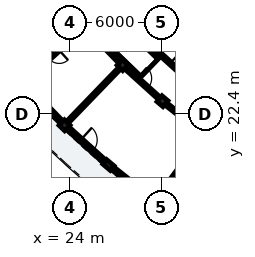
"""IFC4 building model, lengths in metres.
Left out: names, types, materials, properties, quantities, classifications, styles, units other than length and angle.
Written with IfcOpenShell. Run it as: python <this file> out.ifc"""

import sys

from ifc_helpers import new_model, si_unit, direction, frame, frame_2d, origin, origin_2d, place, context, subcontext, project, spatial, rectangle, extrude, element, fill, save


model = new_model("IFC4")
c1 = context("Model", 3, precision=1e-05, world=origin(), true_north=direction((0.0, 1.0)))
c2 = subcontext(c1, "Body", "Model", "MODEL_VIEW")
j1 = project(units=[si_unit("LENGTHUNIT", "METRE"), si_unit("PLANEANGLEUNIT", "RADIAN")], contexts=[c1])
p1 = place(None, origin())
s1 = spatial("IfcSite", under=j1, at=p1, CompositionType="ELEMENT")
p2 = place(p1, origin())
s2 = spatial("IfcBuilding", under=s1, at=p2, CompositionType="ELEMENT")
p3 = place(p2, frame((0.0, 0.0, 29.0)))
s3 = spatial("IfcBuildingStorey", under=s2, at=p3, CompositionType="ELEMENT", Elevation=29.0)
for number, where, z_axis, x_axis in (
    (1, (27.454, 25.62, 0.0), (0.0, 0.0, 1.0), (-0.695, -0.719, 0.0)),
    (2, (23.633, 21.663, 0.0), (0.0, 0.0, 1.0), (-0.695, -0.719, 0.0)),
    (3, (30.077, 23.247, 0.0), (0.0, 0.0, 1.0), (-0.646, -0.763, 0.0)),
):
    element("IfcColumn", number, at=place(p3, frame(where, z_axis=z_axis, x_axis=x_axis)), inside=s3, PredefinedType="COLUMN", context=c2, shape_type="SweptSolid", body=[
        extrude(rectangle(XDim=0.51, YDim=0.51, at=origin_2d()), origin(), (0.0, 0.0, 1.0), 3.115),
    ])
p4 = place(p3, frame((26.523, 19.05, 0.0), z_axis=(0.0, 0.0, 1.0), x_axis=(-0.646123979643, -0.763232469783, 0.0)))
e4 = element("IfcColumn", 4, at=p4, inside=s3, PredefinedType="PILASTER", context=c2, shape_type="SweptSolid", body=[
    extrude(rectangle(XDim=0.39, YDim=0.63, at=origin_2d()), origin(), (0.0, 0.0, 1.0), 3.115),
])
p5 = place(p3, frame((21.035, 24.342, 0.0), z_axis=(0.0, 0.0, 1.0), x_axis=(0.696232818878, -0.717816036263, 0.0)))
e5 = element("IfcWall", 5, at=p5, inside=s3, PredefinedType="SOLIDWALL", context=c2, shape_type="SweptSolid", body=[
    extrude(rectangle(XDim=3.507, YDim=0.245, at=frame_2d((1.753, 0.0))), origin(), (0.0, 0.0, 1.0), 2.355),
])
p6 = place(p5, frame((1.104, 0.0, 0.55)))
e6 = element("IfcOpeningElement", 6, at=p6, cuts=e5, PredefinedType="OPENING", context=c2, shape_type="SweptSolid", body=[
    extrude(rectangle(XDim=1.3, YDim=1.6, at=frame_2d((0.65, 0.8))), frame((0.0, 0.133, 0.0), z_axis=(0.0, -1.0, 0.0), x_axis=(1.0, 0.0, 0.0)), (0.0, 0.0, 1.0), 0.265),
])
p7 = place(p3, frame((23.8, 21.512, 0.0), z_axis=(0.0, 0.0, 1.0), x_axis=(0.741654519649, -0.670782061093, 0.0)))
e7 = element("IfcWall", 7, at=p7, inside=s3, PredefinedType="SOLIDWALL", context=c2, shape_type="SweptSolid", body=[
    extrude(rectangle(XDim=3.507, YDim=0.245, at=frame_2d((1.753, 0.0))), origin(), (0.0, 0.0, 1.0), 2.355),
])
p8 = place(p7, frame((1.213, 0.0, 0.0)))
e8 = element("IfcOpeningElement", 8, at=p8, cuts=e7, PredefinedType="OPENING", context=c2, shape_type="SweptSolid", body=[
    extrude(rectangle(XDim=1.08, YDim=2.15, at=frame_2d((0.54, 1.075))), frame((0.0, 0.133, 0.0), z_axis=(0.0, -1.0, 0.0), x_axis=(1.0, 0.0, 0.0)), (0.0, 0.0, 1.0), 0.265),
])
p9 = place(p3, frame((26.653, 18.947, 0.0), z_axis=(0.0, 0.0, 1.0), x_axis=(0.783976646649, -0.620790316861, 0.0)))
e9 = element("IfcWall", 9, at=p9, inside=s3, PredefinedType="SOLIDWALL", context=c2, shape_type="SweptSolid", body=[
    extrude(rectangle(XDim=3.507, YDim=0.245, at=frame_2d((1.753, 0.0))), origin(), (0.0, 0.0, 1.0), 2.355),
])
p10 = place(p9, frame((0.953, 0.0, 0.35)))
e10 = element("IfcOpeningElement", 10, at=p10, cuts=e9, PredefinedType="OPENING", context=c2, shape_type="SweptSolid", body=[
    extrude(rectangle(XDim=1.6, YDim=1.75, at=frame_2d((0.8, 0.875))), frame((0.0, 0.133, 0.0), z_axis=(0.0, -1.0, 0.0), x_axis=(1.0, 0.0, 0.0)), (0.0, 0.0, 1.0), 0.265),
])
p11 = place(p3, frame((24.695, 27.89, 0.0), z_axis=(0.0, 0.0, 1.0), x_axis=(-0.740212663782, -0.672372822456, 0.0)))
e11 = element("IfcWall", 11, at=p11, inside=s3, PredefinedType="PARTITIONING", context=c2, shape_type="SweptSolid", body=[
    extrude(rectangle(XDim=4.7, YDim=0.125, at=frame_2d((2.35, 0.0))), origin(), (0.0, 0.0, 1.0), 2.37),
])
p12 = place(p11, frame((1.915, 0.0, 0.0)))
e12 = element("IfcOpeningElement", 12, at=p12, cuts=e11, PredefinedType="OPENING", context=c2, shape_type="SweptSolid", body=[
    extrude(rectangle(XDim=0.87, YDim=2.08, at=frame_2d((0.435, 1.04))), frame((0.0, 0.073, 0.0), z_axis=(0.0, -1.0, 0.0), x_axis=(1.0, 0.0, 0.0)), (0.0, 0.0, 1.0), 0.145),
])
p13 = place(p3, frame((25.235, 27.907, 0.0), z_axis=(0.0, 0.0, 1.0), x_axis=(0.696223786753, -0.717824796701, 0.0)))
e13 = element("IfcWall", 13, at=p13, inside=s3, PredefinedType="PARTITIONING", context=c2, shape_type="SweptSolid", body=[
    extrude(rectangle(XDim=2.837, YDim=0.195, at=frame_2d((1.418, 0.0))), origin(), (0.0, 0.0, 1.0), 2.37),
])
p14 = place(p13, frame((0.934, 0.0, 0.0)))
e14 = element("IfcOpeningElement", 14, at=p14, cuts=e13, PredefinedType="OPENING", context=c2, shape_type="SweptSolid", body=[
    extrude(rectangle(XDim=0.97, YDim=2.15, at=frame_2d((0.485, 1.075))), frame((0.0, 0.107, 0.0), z_axis=(0.0, -1.0, 0.0), x_axis=(1.0, 0.0, 0.0)), (0.0, 0.0, 1.0), 0.215),
])
p15 = place(p3, frame((27.176, 25.332, 0.0), z_axis=(0.0, 0.0, 1.0), x_axis=(-0.69466218314, -0.719336118456, 0.0)))
e15 = element("IfcWall", 15, at=p15, inside=s3, PredefinedType="PARTITIONING", context=c2, shape_type="SweptSolid", body=[
    extrude(rectangle(XDim=4.7, YDim=0.175, at=frame_2d((2.35, 0.0))), origin(), (0.0, 0.0, 1.0), 2.37),
])
p16 = place(p3, frame((27.713, 25.385, 0.0), z_axis=(0.0, 0.0, 1.0), x_axis=(0.741631592147, -0.670807410163, 0.0)))
e16 = element("IfcWall", 16, at=p16, inside=s3, PredefinedType="PARTITIONING", context=c2, shape_type="SweptSolid", body=[
    extrude(rectangle(XDim=2.837, YDim=0.195, at=frame_2d((1.418, 0.0))), origin(), (0.0, 0.0, 1.0), 2.37),
])
p17 = place(p16, frame((0.944, 0.0, 0.0)))
e17 = element("IfcOpeningElement", 17, at=p17, cuts=e16, PredefinedType="OPENING", context=c2, shape_type="SweptSolid", body=[
    extrude(rectangle(XDim=0.95, YDim=2.13, at=frame_2d((0.475, 1.065))), frame((0.0, 0.107, 0.0), z_axis=(0.0, -1.0, 0.0), x_axis=(1.0, 0.0, 0.0)), (0.0, 0.0, 1.0), 0.215),
])
p18 = place(p3, frame((29.241, 26.968, 0.0), z_axis=(0.0, 0.0, 1.0), x_axis=(0.74166462946, -0.670770882945, 0.0)))
e18 = element("IfcWall", 18, at=p18, inside=s3, PredefinedType="PARTITIONING", context=c2, shape_type="SweptSolid", body=[
    extrude(rectangle(XDim=2.693, YDim=0.195, at=frame_2d((1.347, 0.0))), origin(), (0.0, 0.0, 1.0), 2.37),
])
p19 = place(p18, frame((0.872, 0.0, 0.0)))
e19 = element("IfcOpeningElement", 19, at=p19, cuts=e18, PredefinedType="OPENING", context=c2, shape_type="SweptSolid", body=[
    extrude(rectangle(XDim=0.95, YDim=2.13, at=frame_2d((0.475, 1.065))), frame((0.0, 0.107, 0.0), z_axis=(0.0, -1.0, 0.0), x_axis=(1.0, 0.0, 0.0)), (0.0, 0.0, 1.0), 0.215),
])
p20 = place(p3, frame((30.351, 23.03, 0.0), z_axis=(0.0, 0.0, 1.0), x_axis=(0.783965548427, -0.620804332201, 0.0)))
e20 = element("IfcWall", 20, at=p20, inside=s3, PredefinedType="PARTITIONING", context=c2, shape_type="SweptSolid", body=[
    extrude(rectangle(XDim=2.837, YDim=0.195, at=frame_2d((1.418, 0.0))), origin(), (0.0, 0.0, 1.0), 2.37),
])
p21 = place(p20, frame((0.954, 0.0, 0.0)))
e21 = element("IfcOpeningElement", 21, at=p21, cuts=e20, PredefinedType="OPENING", context=c2, shape_type="SweptSolid", body=[
    extrude(rectangle(XDim=0.93, YDim=2.12, at=frame_2d((0.465, 1.06))), frame((0.0, 0.107, 0.0), z_axis=(0.0, -1.0, 0.0), x_axis=(1.0, 0.0, 0.0)), (0.0, 0.0, 1.0), 0.215),
])
p22 = place(p3, frame((32.612, 20.73, 0.0), z_axis=(0.0, 0.0, 1.0), x_axis=(-0.59482622273, -0.803854318116, 0.0)))
e22 = element("IfcWall", 22, at=p22, inside=s3, PredefinedType="PARTITIONING", context=c2, shape_type="SweptSolid", body=[
    extrude(rectangle(XDim=4.7, YDim=0.175, at=frame_2d((2.35, 0.0))), origin(), (0.0, 0.0, 1.0), 2.37),
])
p23 = place(p8, origin())
e23 = element("IfcDoor", 23, at=p23, inside=s3, OperationType="SINGLE_SWING_LEFT", PredefinedType="DOOR", context=c2, shape_type="SweptSolid", body=[
    extrude(rectangle(XDim=1.08, YDim=2.15, at=frame_2d((0.54, 1.075))), frame((0.0, 0.025, 0.0), z_axis=(0.0, -1.0, 0.0), x_axis=(1.0, 0.0, 0.0)), (0.0, 0.0, 1.0), 0.05),
])
fill(e8, e23)
p24 = place(p10, origin())
e24 = element("IfcWindow", 24, at=p24, inside=s3, PartitioningType="SINGLE_PANEL", PredefinedType="WINDOW", context=c2, shape_type="SweptSolid", body=[
    extrude(rectangle(XDim=1.6, YDim=1.75, at=frame_2d((0.8, 0.875))), frame((0.0, 0.03, 0.0), z_axis=(0.0, -1.0, 0.0), x_axis=(1.0, 0.0, 0.0)), (0.0, 0.0, 1.0), 0.06),
])
fill(e10, e24)
p25 = place(p12, origin())
e25 = element("IfcDoor", 25, at=p25, inside=s3, OperationType="SINGLE_SWING_LEFT", PredefinedType="DOOR", context=c2, shape_type="SweptSolid", body=[
    extrude(rectangle(XDim=0.87, YDim=2.08, at=frame_2d((0.435, 1.04))), frame((0.0, 0.025, 0.0), z_axis=(0.0, -1.0, 0.0), x_axis=(1.0, 0.0, 0.0)), (0.0, 0.0, 1.0), 0.05),
])
fill(e12, e25)
p26 = place(p17, origin())
e26 = element("IfcDoor", 26, at=p26, inside=s3, OperationType="SINGLE_SWING_LEFT", PredefinedType="DOOR", context=c2, shape_type="SweptSolid", body=[
    extrude(rectangle(XDim=0.95, YDim=2.13, at=frame_2d((0.475, 1.065))), frame((0.0, 0.025, 0.0), z_axis=(0.0, -1.0, 0.0), x_axis=(1.0, 0.0, 0.0)), (0.0, 0.0, 1.0), 0.05),
])
fill(e17, e26)
p27 = place(p19, origin())
e27 = element("IfcDoor", 27, at=p27, inside=s3, OperationType="SINGLE_SWING_RIGHT", PredefinedType="DOOR", context=c2, shape_type="SweptSolid", body=[
    extrude(rectangle(XDim=0.95, YDim=2.13, at=frame_2d((0.475, 1.065))), frame((0.0, 0.025, 0.0), z_axis=(0.0, -1.0, 0.0), x_axis=(1.0, 0.0, 0.0)), (0.0, 0.0, 1.0), 0.05),
])
fill(e19, e27)
save(model, sys.argv[1])
